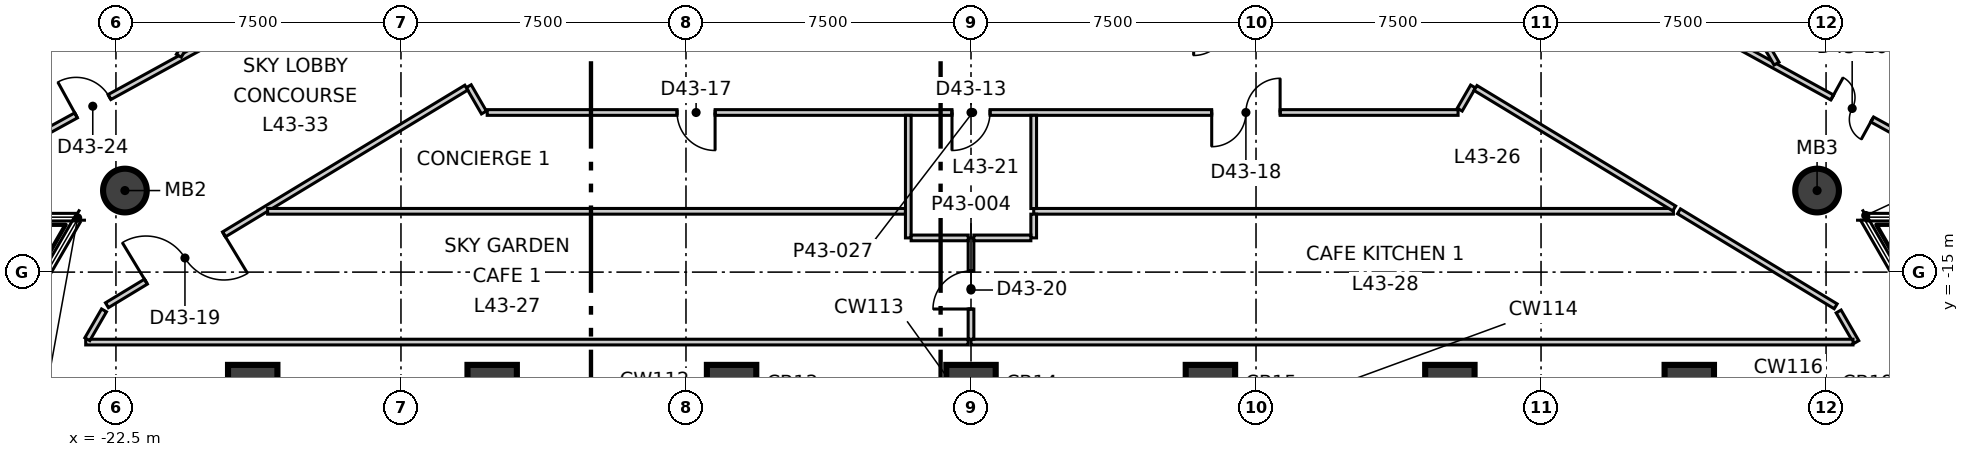
"""IFC4 building model, lengths in metres.
Left out: names, types, materials, properties, quantities, classifications, styles, units other than length and angle.
Written with IfcOpenShell. Run it as: python <this file> out.ifc"""

import sys

from ifc_helpers import new_model, si_unit, direction, frame, frame_2d, origin, origin_2d, place, context, subcontext, project, spatial, rectangle, circle, extrude, element, fill, save


model = new_model("IFC4")
c1 = context("Model", 3, precision=1e-05, world=origin(), true_north=direction((0.0, 1.0)))
c2 = subcontext(c1, "Body", "Model", "MODEL_VIEW")
j1 = project(units=[si_unit("LENGTHUNIT", "METRE"), si_unit("PLANEANGLEUNIT", "RADIAN")], contexts=[c1])
p1 = place(None, origin())
s1 = spatial("IfcSite", under=j1, at=p1, CompositionType="ELEMENT")
p2 = place(p1, origin())
s2 = spatial("IfcBuilding", under=s1, at=p2, CompositionType="ELEMENT")
p3 = place(p2, frame((0.0, 0.0, 185.3)))
s3 = spatial("IfcBuildingStorey", under=s2, at=p3, CompositionType="ELEMENT", Elevation=185.3)
for number, where, z_axis, x_axis in (
    (1, (-18.901, -17.941, -0.6), (0.0, 0.0, 1.0), (1.0, 0.0, 0.0)),
    (2, (-12.6, -17.941, -0.6), (0.0, 0.0, 1.0), (1.0, 0.0, 0.0)),
    (3, (-6.3, -17.941, -0.6), (0.0, 0.0, 1.0), (1.0, 0.0, 0.0)),
    (4, (0.0, -17.941, -0.6), (0.0, 0.0, 1.0), (1.0, 0.0, 0.0)),
    (5, (6.3, -17.941, -0.6), (0.0, 0.0, 1.0), (1.0, 0.0, 0.0)),
    (6, (12.601, -17.941, -0.6), (0.0, 0.0, 1.0), (1.0, 0.0, 0.0)),
    (7, (18.901, -17.941, -0.6), (0.0, 0.0, 1.0), (1.0, 0.0, 0.0)),
):
    element("IfcColumn", number, at=place(p3, frame(where, z_axis=z_axis, x_axis=x_axis)), inside=s3, PredefinedType="COLUMN", context=c2, shape_type="SweptSolid", body=[
        extrude(rectangle(XDim=1.3, YDim=1.0, at=origin_2d()), origin(), (0.0, 0.0, 1.0), 6.3),
    ])
for number, where, z_axis, x_axis in (
    (8, (-22.264, -12.854, -0.6), (0.0, 0.0, 1.0), (1.0, 0.0, 0.0)),
    (9, (22.264, -12.854, -0.6), (0.0, 0.0, 1.0), (1.0, 0.0, 0.0)),
):
    element("IfcColumn", number, at=place(p3, frame(where, z_axis=z_axis, x_axis=x_axis)), inside=s3, PredefinedType="COLUMN", context=c2, shape_type="SweptSolid", body=[
        extrude(circle(Radius=0.575, at=origin_2d()), origin(), (0.0, 0.0, 1.0), 6.3),
    ])
p4 = place(p3, frame((18.629, -13.4, 0.0), z_axis=(0.0, 0.0, 1.0), x_axis=(0.855143428813, -0.518391469989, 0.0)))
e10 = element("IfcWall", 10, at=p4, inside=s3, PredefinedType="PARTITIONING", context=c2, shape_type="SweptSolid", body=[
    extrude(rectangle(XDim=4.823, YDim=0.15, at=frame_2d((2.411, 0.0))), origin(), (0.0, 0.0, 1.0), 5.0),
])
p5 = place(p3, frame((22.831, -16.035, 0.0), z_axis=(0.0, 0.0, 1.0), x_axis=(0.499525600878, -0.866299125053, 0.0)))
e11 = element("IfcWall", 11, at=p5, inside=s3, PredefinedType="PARTITIONING", context=c2, shape_type="SweptSolid", body=[
    extrude(rectangle(XDim=0.931, YDim=0.15, at=frame_2d((0.465, 0.0))), origin(), (0.0, 0.0, 1.0), 5.7),
])
p6 = place(p3, frame((0.0, -16.841, 0.0), z_axis=(0.0, 0.0, 1.0), x_axis=(1.0, 0.0, 0.0)))
e12 = element("IfcWall", 12, at=p6, inside=s3, PredefinedType="PARTITIONING", context=c2, shape_type="SweptSolid", body=[
    extrude(rectangle(XDim=23.209, YDim=0.15, at=frame_2d((11.604, 0.0))), origin(), (0.0, 0.0, 1.0), 5.7),
])
p7 = place(p3, frame((0.0, -16.766, 0.0), z_axis=(0.0, 0.0, 1.0), x_axis=(0.0, 1.0, 0.0)))
e13 = element("IfcWall", 13, at=p7, inside=s3, PredefinedType="PARTITIONING", context=c2, shape_type="SweptSolid", body=[
    extrude(rectangle(XDim=2.666, YDim=0.15, at=frame_2d((1.333, 0.0))), origin(), (0.0, 0.0, 1.0), 5.2),
])
p8 = place(p7, frame((0.795, 0.0, 0.0)))
e14 = element("IfcOpeningElement", 14, at=p8, cuts=e13, PredefinedType="OPENING", context=c2, shape_type="SweptSolid", body=[
    extrude(rectangle(XDim=1.0, YDim=2.1, at=frame_2d((0.5, 1.05))), frame((0.0, 0.085, 0.0), z_axis=(0.0, -1.0, 0.0), x_axis=(1.0, 0.0, 0.0)), (0.0, 0.0, 1.0), 0.17),
])
p9 = place(p3, frame((1.65, -13.4, 0.0), z_axis=(0.0, 0.0, 1.0), x_axis=(1.0, 0.0, 0.0)))
e15 = element("IfcWall", 15, at=p9, inside=s3, PredefinedType="PARTITIONING", context=c2, shape_type="SweptSolid", body=[
    extrude(rectangle(XDim=16.834, YDim=0.15, at=frame_2d((8.417, 0.0))), origin(), (0.0, 0.0, 1.0), 5.7),
])
p10 = place(p3, frame((1.65, -14.1, 0.0), z_axis=(0.0, 0.0, 1.0), x_axis=(0.0, 1.0, 0.0)))
e16 = element("IfcWall", 16, at=p10, inside=s3, PredefinedType="PARTITIONING", context=c2, shape_type="SweptSolid", body=[
    extrude(rectangle(XDim=0.625, YDim=0.15, at=frame_2d((0.312, 0.0))), origin(), (0.0, 0.0, 1.0), 5.7),
])
p11 = place(p3, frame((0.075, -14.1, 0.0), z_axis=(0.0, 0.0, 1.0), x_axis=(1.0, 0.0, 0.0)))
e17 = element("IfcWall", 17, at=p11, inside=s3, PredefinedType="PARTITIONING", context=c2, shape_type="SweptSolid", body=[
    extrude(rectangle(XDim=1.5, YDim=0.15, at=frame_2d((0.75, 0.0))), origin(), (0.0, 0.0, 1.0), 5.7),
])
p12 = place(p3, frame((2.98, 28.52, 0.0), z_axis=(0.0, 0.0, 1.0), x_axis=(0.500012382508, -0.866018254622, 0.0)))
e18 = element("IfcWall", 18, at=p12, inside=s3, PredefinedType="PARTITIONING", context=c2, shape_type="SweptSolid", body=[
    extrude(rectangle(XDim=46.505, YDim=0.15, at=frame_2d((23.252, 0.0))), origin(), (0.0, 0.0, 1.0), 5.7),
])
p13 = place(p3, frame((15.362, -6.392, 0.0), z_axis=(0.0, 0.0, 1.0), x_axis=(0.876310300544, -0.481747088378, 0.0)))
e19 = element("IfcWall", 19, at=p13, inside=s3, PredefinedType="PARTITIONING", context=c2, shape_type="SweptSolid", body=[
    extrude(rectangle(XDim=10.974, YDim=0.15, at=frame_2d((5.487, 0.0))), origin(), (0.0, 0.0, 1.0), 5.0),
])
p14 = place(p13, frame((8.33, 0.0, 0.0)))
e20 = element("IfcOpeningElement", 20, at=p14, cuts=e19, PredefinedType="OPENING", context=c2, shape_type="SweptSolid", body=[
    extrude(rectangle(XDim=1.2, YDim=2.1, at=frame_2d((0.6, 1.05))), frame((0.0, 0.085, 0.0), z_axis=(0.0, -1.0, 0.0), x_axis=(1.0, 0.0, 0.0)), (0.0, 0.0, 1.0), 0.17),
])
p15 = place(p3, frame((2.371, 23.093, 0.0), z_axis=(0.0, 0.0, 1.0), x_axis=(0.500006092323, -0.866021886352, 0.0)))
e21 = element("IfcWall", 21, at=p15, inside=s3, PredefinedType="PARTITIONING", context=c2, shape_type="SweptSolid", body=[
    extrude(rectangle(XDim=37.651, YDim=0.15, at=frame_2d((18.826, 0.0))), origin(), (0.0, 0.0, 1.0), 5.7),
])
p16 = place(p3, frame((-13.217, -10.108, 0.0), z_axis=(0.0, 0.0, 1.0), x_axis=(0.500506525424, -0.865732763622, 0.0)))
e22 = element("IfcWall", 22, at=p16, inside=s3, PredefinedType="PARTITIONING", context=c2, shape_type="SweptSolid", body=[
    extrude(rectangle(XDim=0.8, YDim=0.15, at=frame_2d((0.4, 0.0))), origin(), (0.0, 0.0, 1.0), 5.7),
])
p17 = place(p3, frame((-25.148, -11.754, 0.0), z_axis=(0.0, 0.0, 1.0), x_axis=(0.876565430859, 0.481282708419, 0.0)))
e23 = element("IfcWall", 23, at=p17, inside=s3, PredefinedType="PARTITIONING", context=c2, shape_type="SweptSolid", body=[
    extrude(rectangle(XDim=11.083, YDim=0.15, at=frame_2d((5.542, 0.0))), origin(), (0.0, 0.0, 1.0), 5.0),
])
p18 = place(p17, frame((1.825, 0.0, 0.0)))
e24 = element("IfcOpeningElement", 24, at=p18, cuts=e23, PredefinedType="OPENING", context=c2, shape_type="SweptSolid", body=[
    extrude(rectangle(XDim=1.0, YDim=2.1, at=frame_2d((0.5, 1.05))), frame((0.0, 0.085, 0.0), z_axis=(0.0, -1.0, 0.0), x_axis=(1.0, 0.0, 0.0)), (0.0, 0.0, 1.0), 0.17),
])
p19 = place(p3, frame((-20.846, -9.307, 0.0), z_axis=(0.0, 0.0, 1.0), x_axis=(0.499999225185, 0.866025851124, 0.0)))
e25 = element("IfcWall", 25, at=p19, inside=s3, PredefinedType="PARTITIONING", context=c2, shape_type="SweptSolid", body=[
    extrude(rectangle(XDim=13.108, YDim=0.15, at=frame_2d((6.554, 0.0))), origin(), (0.0, 0.0, 1.0), 5.7),
])
p20 = place(p3, frame((-26.19, -11.679, 0.0), z_axis=(0.0, 0.0, 1.0), x_axis=(0.500012382508, 0.866018254622, 0.0)))
e26 = element("IfcWall", 26, at=p20, inside=s3, PredefinedType="PARTITIONING", context=c2, shape_type="SweptSolid", body=[
    extrude(rectangle(XDim=46.505, YDim=0.15, at=frame_2d((23.252, 0.0))), origin(), (0.0, 0.0, 1.0), 5.7),
])
p21 = place(p3, frame((-22.737, -15.872, 0.0), z_axis=(0.0, 0.0, 1.0), x_axis=(0.85539296063, 0.517979616302, 0.0)))
e27 = element("IfcWall", 27, at=p21, inside=s3, PredefinedType="PARTITIONING", context=c2, shape_type="SweptSolid", body=[
    extrude(rectangle(XDim=11.055, YDim=0.15, at=frame_2d((5.527, 0.0))), origin(), (0.0, 0.0, 1.0), 5.0),
])
p22 = place(p21, frame((1.2, 0.0, 0.0)))
e28 = element("IfcOpeningElement", 28, at=p22, cuts=e27, PredefinedType="OPENING", context=c2, shape_type="SweptSolid", body=[
    extrude(rectangle(XDim=2.4, YDim=2.1, at=frame_2d((1.2, 1.05))), frame((0.0, 0.085, 0.0), z_axis=(0.0, -1.0, 0.0), x_axis=(1.0, 0.0, 0.0)), (0.0, 0.0, 1.0), 0.17),
])
p23 = place(p3, frame((-12.731, -10.8, 0.0), z_axis=(0.0, 0.0, 1.0), x_axis=(1.0, 0.0, 0.0)))
e29 = element("IfcWall", 29, at=p23, inside=s3, PredefinedType="PARTITIONING", context=c2, shape_type="SweptSolid", body=[
    extrude(rectangle(XDim=25.548, YDim=0.15, at=frame_2d((12.774, 0.0))), origin(), (0.0, 0.0, 1.0), 5.7),
])
p24 = place(p23, frame((12.231, 0.0, 0.0)))
e30 = element("IfcOpeningElement", 30, at=p24, cuts=e29, PredefinedType="OPENING", context=c2, shape_type="SweptSolid", body=[
    extrude(rectangle(XDim=1.0, YDim=2.1, at=frame_2d((0.5, 1.05))), frame((0.0, 0.085, 0.0), z_axis=(0.0, -1.0, 0.0), x_axis=(1.0, 0.0, 0.0)), (0.0, 0.0, 1.0), 0.17),
])
p25 = place(p23, frame((4.997, 0.0, 0.0)))
e31 = element("IfcOpeningElement", 31, at=p25, cuts=e29, PredefinedType="OPENING", context=c2, shape_type="SweptSolid", body=[
    extrude(rectangle(XDim=1.0, YDim=2.1, at=frame_2d((0.5, 1.05))), frame((0.0, 0.085, 0.0), z_axis=(0.0, -1.0, 0.0), x_axis=(1.0, 0.0, 0.0)), (0.0, 0.0, 1.0), 0.17),
])
p26 = place(p23, frame((19.065, 0.0, 0.0)))
e32 = element("IfcOpeningElement", 32, at=p26, cuts=e29, PredefinedType="OPENING", context=c2, shape_type="SweptSolid", body=[
    extrude(rectangle(XDim=1.8, YDim=2.1, at=frame_2d((0.9, 1.05))), frame((0.0, 0.085, 0.0), z_axis=(0.0, -1.0, 0.0), x_axis=(1.0, 0.0, 0.0)), (0.0, 0.0, 1.0), 0.17),
])
p27 = place(p3, frame((-23.296, -16.841, 0.0), z_axis=(0.0, 0.0, 1.0), x_axis=(1.0, 0.0, 0.0)))
e33 = element("IfcWall", 33, at=p27, inside=s3, PredefinedType="PARTITIONING", context=c2, shape_type="SweptSolid", body=[
    extrude(rectangle(XDim=23.221, YDim=0.15, at=frame_2d((11.61, 0.0))), origin(), (0.0, 0.0, 1.0), 5.7),
])
p28 = place(p3, frame((-23.253, -16.766, 0.0), z_axis=(0.0, 0.0, 1.0), x_axis=(0.500630112967, 0.865661302121, 0.0)))
e34 = element("IfcWall", 34, at=p28, inside=s3, PredefinedType="PARTITIONING", context=c2, shape_type="SweptSolid", body=[
    extrude(rectangle(XDim=0.877, YDim=0.15, at=frame_2d((0.438, 0.0))), origin(), (0.0, 0.0, 1.0), 5.7),
])
p29 = place(p3, frame((-18.509, -13.4, 0.0), z_axis=(0.0, 0.0, 1.0), x_axis=(1.0, 0.0, 0.0)))
e35 = element("IfcWall", 35, at=p29, inside=s3, PredefinedType="PARTITIONING", context=c2, shape_type="SweptSolid", body=[
    extrude(rectangle(XDim=16.784, YDim=0.15, at=frame_2d((8.392, 0.0))), origin(), (0.0, 0.0, 1.0), 5.7),
])
p30 = place(p3, frame((-1.65, -14.1, 0.0), z_axis=(0.0, 0.0, 1.0), x_axis=(0.0, 1.0, 0.0)))
e36 = element("IfcWall", 36, at=p30, inside=s3, PredefinedType="PARTITIONING", context=c2, shape_type="SweptSolid", body=[
    extrude(rectangle(XDim=3.225, YDim=0.15, at=frame_2d((1.613, 0.0))), origin(), (0.0, 0.0, 1.0), 5.7),
])
p31 = place(p3, frame((-1.575, -14.1, 0.0), z_axis=(0.0, 0.0, 1.0), x_axis=(1.0, 0.0, 0.0)))
e37 = element("IfcWall", 37, at=p31, inside=s3, PredefinedType="PARTITIONING", context=c2, shape_type="SweptSolid", body=[
    extrude(rectangle(XDim=1.502, YDim=0.15, at=frame_2d((0.751, 0.0))), origin(), (0.0, 0.0, 1.0), 5.7),
])
p32 = place(p3, frame((1.65, -13.327, 0.0), z_axis=(0.0, 0.0, 1.0), x_axis=(0.0, 1.0, 0.0)))
e38 = element("IfcWall", 38, at=p32, inside=s3, PredefinedType="PARTITIONING", context=c2, shape_type="SweptSolid", body=[
    extrude(rectangle(XDim=2.452, YDim=0.15, at=frame_2d((1.226, 0.0))), origin(), (0.0, 0.0, 1.0), 5.7),
])
p33 = place(p3, frame((12.86, -10.725, 0.0), z_axis=(0.0, 0.0, 1.0), x_axis=(0.500133030451, 0.865948584993, 0.0)))
e39 = element("IfcWall", 39, at=p33, inside=s3, PredefinedType="PARTITIONING", context=c2, shape_type="SweptSolid", body=[
    extrude(rectangle(XDim=0.703, YDim=0.15, at=frame_2d((0.352, 0.0))), origin(), (0.0, 0.0, 1.0), 5.7),
])
p34 = place(p3, frame((13.276, -10.155, 0.0), z_axis=(0.0, 0.0, 1.0), x_axis=(0.855137762332, -0.518400817355, 0.0)))
e40 = element("IfcWall", 40, at=p34, inside=s3, PredefinedType="PARTITIONING", context=c2, shape_type="SweptSolid", body=[
    extrude(rectangle(XDim=6.115, YDim=0.15, at=frame_2d((3.057, 0.0))), origin(), (0.0, 0.0, 1.0), 5.0),
])
p35 = place(p24, origin())
e41 = element("IfcDoor", 41, at=p35, inside=s3, OperationType="SINGLE_SWING_LEFT", PredefinedType="DOOR", context=c2, shape_type="SweptSolid", body=[
    extrude(rectangle(XDim=1.0, YDim=2.1, at=frame_2d((0.5, 1.05))), frame((0.0, 0.025, 0.0), z_axis=(0.0, -1.0, 0.0), x_axis=(1.0, 0.0, 0.0)), (0.0, 0.0, 1.0), 0.05),
])
fill(e30, e41)
p36 = place(p14, origin())
e42 = element("IfcDoor", 42, at=p36, inside=s3, OperationType="DOUBLE_DOOR_SINGLE_SWING", PredefinedType="DOOR", context=c2, shape_type="SweptSolid", body=[
    extrude(rectangle(XDim=1.2, YDim=2.1, at=frame_2d((0.6, 1.05))), frame((0.0, 0.025, 0.0), z_axis=(0.0, -1.0, 0.0), x_axis=(1.0, 0.0, 0.0)), (0.0, 0.0, 1.0), 0.05),
])
fill(e20, e42)
p37 = place(p25, origin())
e43 = element("IfcDoor", 43, at=p37, inside=s3, OperationType="SINGLE_SWING_RIGHT", PredefinedType="DOOR", context=c2, shape_type="SweptSolid", body=[
    extrude(rectangle(XDim=1.0, YDim=2.1, at=frame_2d((0.5, 1.05))), frame((0.0, 0.025, 0.0), z_axis=(0.0, -1.0, 0.0), x_axis=(1.0, 0.0, 0.0)), (0.0, 0.0, 1.0), 0.05),
])
fill(e31, e43)
p38 = place(p26, origin())
e44 = element("IfcDoor", 44, at=p38, inside=s3, OperationType="DOUBLE_DOOR_SINGLE_SWING", PredefinedType="DOOR", context=c2, shape_type="SweptSolid", body=[
    extrude(rectangle(XDim=1.8, YDim=2.1, at=frame_2d((0.9, 1.05))), frame((0.0, 0.025, 0.0), z_axis=(0.0, -1.0, 0.0), x_axis=(1.0, 0.0, 0.0)), (0.0, 0.0, 1.0), 0.05),
])
fill(e32, e44)
p39 = place(p22, origin())
e45 = element("IfcDoor", 45, at=p39, inside=s3, OperationType="DOUBLE_DOOR_SINGLE_SWING", PredefinedType="DOOR", context=c2, shape_type="SweptSolid", body=[
    extrude(rectangle(XDim=2.4, YDim=2.1, at=frame_2d((1.2, 1.05))), frame((0.0, 0.025, 0.0), z_axis=(0.0, -1.0, 0.0), x_axis=(1.0, 0.0, 0.0)), (0.0, 0.0, 1.0), 0.05),
])
fill(e28, e45)
p40 = place(p8, origin())
e46 = element("IfcDoor", 46, at=p40, inside=s3, OperationType="SINGLE_SWING_RIGHT", PredefinedType="DOOR", context=c2, shape_type="SweptSolid", body=[
    extrude(rectangle(XDim=1.0, YDim=2.1, at=frame_2d((0.5, 1.05))), frame((0.0, 0.025, 0.0), z_axis=(0.0, -1.0, 0.0), x_axis=(1.0, 0.0, 0.0)), (0.0, 0.0, 1.0), 0.05),
])
fill(e14, e46)
p41 = place(p18, origin())
e47 = element("IfcDoor", 47, at=p41, inside=s3, OperationType="SINGLE_SWING_RIGHT", PredefinedType="DOOR", context=c2, shape_type="SweptSolid", body=[
    extrude(rectangle(XDim=1.0, YDim=2.1, at=frame_2d((0.5, 1.05))), frame((0.0, 0.025, 0.0), z_axis=(0.0, -1.0, 0.0), x_axis=(1.0, 0.0, 0.0)), (0.0, 0.0, 1.0), 0.05),
])
fill(e24, e47)
save(model, sys.argv[1])
